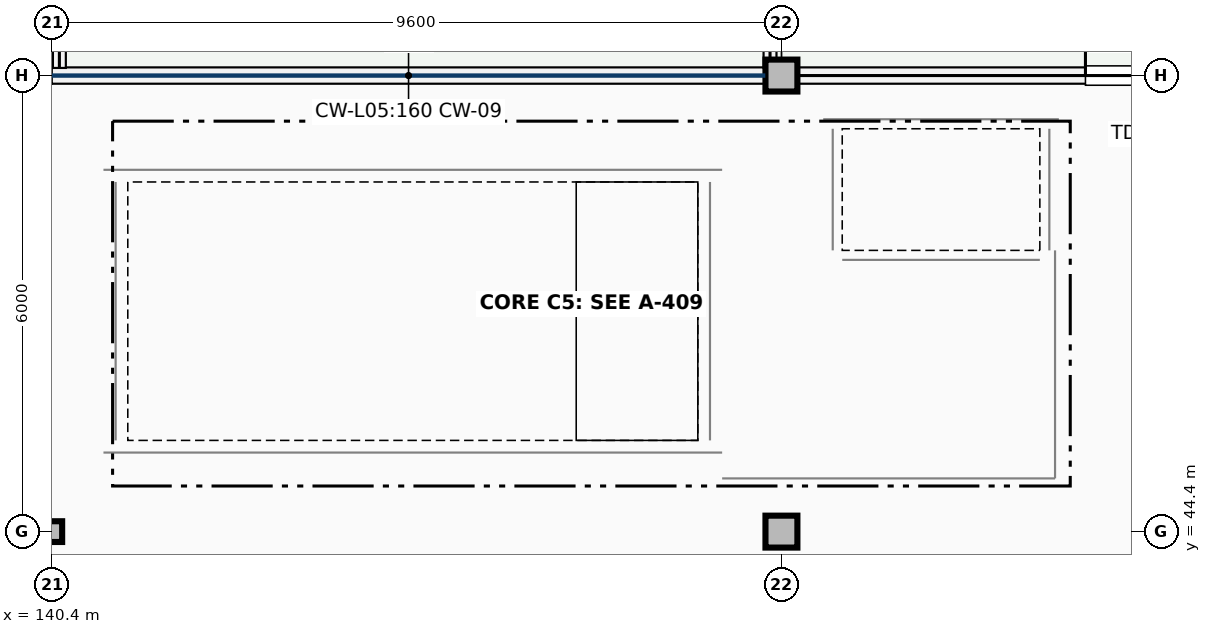
"""IFC4 building model, lengths in metres.
Left out: names, types, materials, properties, quantities, classifications, styles, units other than length and angle.
Written with IfcOpenShell. Run it as: python <this file> out.ifc"""

import sys

from ifc_helpers import new_model, si_unit, direction, frame, frame_2d, origin, origin_2d, place, context, subcontext, project, spatial, rectangle, hollow_circle, extrude, element, fill, save


model = new_model("IFC4")
c1 = context("Model", 3, precision=1e-05, world=origin(), true_north=direction((0.0, 1.0)))
c2 = subcontext(c1, "Body", "Model", "MODEL_VIEW")
j1 = project(units=[si_unit("LENGTHUNIT", "METRE"), si_unit("PLANEANGLEUNIT", "RADIAN")], contexts=[c1])
p1 = place(None, origin())
s1 = spatial("IfcSite", under=j1, at=p1, CompositionType="ELEMENT")
p2 = place(p1, origin())
s2 = spatial("IfcBuilding", under=s1, at=p2, CompositionType="ELEMENT")
p3 = place(p2, frame((0.0, 0.0, 21.08)))
s3 = spatial("IfcBuildingStorey", under=s2, at=p3, CompositionType="ELEMENT", Elevation=21.08)
p4 = place(p3, frame((140.4, 44.4, 0.0), z_axis=(0.0, 0.0, 1.0), x_axis=(1.0, 0.0, 0.0)))
e1 = element("IfcColumn", 1, at=p4, inside=s3, PredefinedType="COLUMN", context=c2, shape_type="SweptSolid", body=[
    extrude(hollow_circle(Radius=0.136, WallThickness=0.012, at=origin_2d()), origin(), (0.0, 0.0, 1.0), 3.7),
])
for number, where, z_axis, x_axis in (
    (2, (150.0, 44.4, 0.0), (0.0, 0.0, 1.0), (1.0, 0.0, 0.0)),
    (3, (150.0, 50.4, 0.0), (0.0, 0.0, 1.0), (1.0, 0.0, 0.0)),
):
    element("IfcColumn", number, at=place(p3, frame(where, z_axis=z_axis, x_axis=x_axis)), inside=s3, PredefinedType="COLUMN", context=c2, shape_type="SweptSolid", body=[
        extrude(rectangle(XDim=0.42, YDim=0.42, at=origin_2d()), origin(), (0.0, 0.0, 1.0), 3.74),
    ])
p5 = place(p3, frame((140.4, 50.4, 0.0), z_axis=(0.0, 0.0, 1.0), x_axis=(1.0, 0.0, 0.0)))
e4 = element("IfcWall", 4, at=p5, inside=s3, PredefinedType="SOLIDWALL", context=c2, shape_type="SweptSolid", body=[
    extrude(rectangle(XDim=9.388, YDim=0.215, at=frame_2d((4.694, 0.0))), origin(), (0.0, 0.0, 1.0), 0.85),
])
p6 = place(p3, frame((150.212, 50.4, 0.0), z_axis=(0.0, 0.0, 1.0), x_axis=(1.0, 0.0, 0.0)))
e5 = element("IfcWall", 5, at=p6, inside=s3, PredefinedType="SOLIDWALL", context=c2, shape_type="SweptSolid", body=[
    extrude(rectangle(XDim=9.25, YDim=0.215, at=frame_2d((4.625, 0.0))), origin(), (0.0, 0.0, 1.0), 2.884),
])
p7 = place(p6, frame((3.788, 0.0, 0.0)))
e6 = element("IfcOpeningElement", 6, at=p7, cuts=e5, PredefinedType="OPENING", context=c2, shape_type="SweptSolid", body=[
    extrude(rectangle(XDim=1.6, YDim=2.2, at=frame_2d((0.8, 1.1))), frame((0.0, 0.118, 0.0), z_axis=(0.0, -1.0, 0.0), x_axis=(1.0, 0.0, 0.0)), (0.0, 0.0, 1.0), 0.235),
])
for number, where, z_axis, x_axis in (
    (7, (149.85, 50.5, 0.0), (0.0, 0.0, 1.0), (0.0, 1.0, 0.0)),
    (8, (140.5, 79.1, 0.0), (0.0, 0.0, 1.0), (0.0, -1.0, 0.0)),
):
    element("IfcWall", number, at=place(p3, frame(where, z_axis=z_axis, x_axis=x_axis)), inside=s3, PredefinedType="PARAPET", context=c2, shape_type="SweptSolid", body=[
        extrude(rectangle(XDim=28.6, YDim=0.17, at=frame_2d((14.3, 0.0))), origin(), (0.0, 0.0, 1.0), 1.15),
    ])
p8 = place(p3, frame((141.24, 45.6, 0.0), z_axis=(0.0, 0.0, 1.0), x_axis=(0.0, 1.0, 0.0)))
e9 = element("IfcWall", 9, at=p8, inside=s3, PredefinedType="SHEAR", context=c2, shape_type="SweptSolid", body=[
    extrude(rectangle(XDim=3.4, YDim=0.32, at=frame_2d((1.7, 0.0))), origin(), (0.0, 0.0, 1.0), 3.74),
])
for number, where, z_axis, x_axis in (
    (10, (141.08, 45.44, 0.0), (0.0, 0.0, 1.0), (1.0, 0.0, 0.0)),
    (11, (141.08, 49.16, 0.0), (0.0, 0.0, 1.0), (1.0, 0.0, 0.0)),
):
    element("IfcWall", number, at=place(p3, frame(where, z_axis=z_axis, x_axis=x_axis)), inside=s3, PredefinedType="SHEAR", context=c2, shape_type="SweptSolid", body=[
        extrude(rectangle(XDim=8.14, YDim=0.32, at=frame_2d((4.07, 0.0))), origin(), (0.0, 0.0, 1.0), 3.74),
    ])
p9 = place(p3, frame((149.06, 45.6, 0.0), z_axis=(0.0, 0.0, 1.0), x_axis=(0.0, 1.0, 0.0)))
e12 = element("IfcWall", 12, at=p9, inside=s3, PredefinedType="SHEAR", context=c2, shape_type="SweptSolid", body=[
    extrude(rectangle(XDim=3.4, YDim=0.32, at=frame_2d((1.7, 0.0))), origin(), (0.0, 0.0, 1.0), 3.74),
])
p10 = place(p9, frame((0.65, 0.0, 0.0)))
e13 = element("IfcOpeningElement", 13, at=p10, cuts=e12, PredefinedType="OPENING", context=c2, shape_type="SweptSolid", body=[
    extrude(rectangle(XDim=1.2, YDim=2.2, at=frame_2d((0.6, 1.1))), frame((0.0, 0.17, 0.0), z_axis=(0.0, -1.0, 0.0), x_axis=(1.0, 0.0, 0.0)), (0.0, 0.0, 1.0), 0.34),
])
for number, where, z_axis, x_axis in (
    (14, (150.675, 48.1, 0.0), (0.0, 0.0, 1.0), (0.0, 1.0, 0.0)),
    (15, (153.525, 48.1, 0.0), (0.0, 0.0, 1.0), (0.0, 1.0, 0.0)),
):
    element("IfcWall", number, at=place(p3, frame(where, z_axis=z_axis, x_axis=x_axis)), inside=s3, PredefinedType="SHEAR", context=c2, shape_type="SweptSolid", body=[
        extrude(rectangle(XDim=1.6, YDim=0.25, at=frame_2d((0.8, 0.0))), origin(), (0.0, 0.0, 1.0), 3.74),
    ])
p11 = place(p3, frame((150.55, 49.825, 0.0), z_axis=(0.0, 0.0, 1.0), x_axis=(1.0, 0.0, 0.0)))
e16 = element("IfcWall", 16, at=p11, inside=s3, PredefinedType="SHEAR", context=c2, shape_type="SweptSolid", body=[
    extrude(rectangle(XDim=3.1, YDim=0.25, at=frame_2d((1.55, 0.0))), origin(), (0.0, 0.0, 1.0), 3.74),
])
p12 = place(p3, frame((150.8, 47.975, 0.0), z_axis=(0.0, 0.0, 1.0), x_axis=(1.0, 0.0, 0.0)))
e17 = element("IfcWall", 17, at=p12, inside=s3, PredefinedType="SHEAR", context=c2, shape_type="SweptSolid", body=[
    extrude(rectangle(XDim=2.6, YDim=0.25, at=frame_2d((1.3, 0.0))), origin(), (0.0, 0.0, 1.0), 3.74),
])
p13 = place(p12, frame((0.75, 0.0, 0.0)))
e18 = element("IfcOpeningElement", 18, at=p13, cuts=e17, PredefinedType="OPENING", context=c2, shape_type="SweptSolid", body=[
    extrude(rectangle(XDim=1.1, YDim=2.15, at=frame_2d((0.55, 1.075))), frame((0.0, 0.135, 0.0), z_axis=(0.0, -1.0, 0.0), x_axis=(1.0, 0.0, 0.0)), (0.0, 0.0, 1.0), 0.27),
])
p14 = place(p3, frame((153.6, 45.1, 0.0), z_axis=(0.0, 0.0, 1.0), x_axis=(0.0, 1.0, 0.0)))
e19 = element("IfcWall", 19, at=p14, inside=s3, PredefinedType="PARTITIONING", context=c2, shape_type="SweptSolid", body=[
    extrude(rectangle(XDim=3.0, YDim=0.2, at=frame_2d((1.5, 0.0))), origin(), (0.0, 0.0, 1.0), 3.164),
])
p15 = place(p14, frame((0.775, 0.0, 0.0)))
e20 = element("IfcOpeningElement", 20, at=p15, cuts=e19, PredefinedType="OPENING", context=c2, shape_type="SweptSolid", body=[
    extrude(rectangle(XDim=1.45, YDim=2.2, at=frame_2d((0.725, 1.1))), frame((0.0, 0.11, 0.0), z_axis=(0.0, -1.0, 0.0), x_axis=(1.0, 0.0, 0.0)), (0.0, 0.0, 1.0), 0.22),
])
p16 = place(p3, frame((149.22, 45.1, 0.0), z_axis=(0.0, 0.0, 1.0), x_axis=(1.0, 0.0, 0.0)))
e21 = element("IfcWall", 21, at=p16, inside=s3, PredefinedType="PARTITIONING", context=c2, shape_type="SweptSolid", body=[
    extrude(rectangle(XDim=4.38, YDim=0.2, at=frame_2d((2.19, 0.0))), origin(), (0.0, 0.0, 1.0), 3.164),
])
p17 = place(p7, origin())
e22 = element("IfcDoor", 22, at=p17, inside=s3, OperationType="DOUBLE_DOOR_SINGLE_SWING", PredefinedType="DOOR", context=c2, shape_type="SweptSolid", body=[
    extrude(rectangle(XDim=1.6, YDim=2.2, at=frame_2d((0.8, 1.1))), frame((0.0, 0.025, 0.0), z_axis=(0.0, -1.0, 0.0), x_axis=(1.0, 0.0, 0.0)), (0.0, 0.0, 1.0), 0.05),
])
fill(e6, e22)
p18 = place(p10, origin())
e23 = element("IfcDoor", 23, at=p18, inside=s3, OperationType="SINGLE_SWING_RIGHT", PredefinedType="DOOR", context=c2, shape_type="SweptSolid", body=[
    extrude(rectangle(XDim=1.2, YDim=2.2, at=frame_2d((0.6, 1.1))), frame((0.0, 0.025, 0.0), z_axis=(0.0, -1.0, 0.0), x_axis=(1.0, 0.0, 0.0)), (0.0, 0.0, 1.0), 0.05),
])
fill(e13, e23)
p19 = place(p13, origin())
e24 = element("IfcDoor", 24, at=p19, inside=s3, OperationType="DOUBLE_DOOR_SLIDING", PredefinedType="DOOR", context=c2, shape_type="SweptSolid", body=[
    extrude(rectangle(XDim=1.1, YDim=2.15, at=frame_2d((0.55, 1.075))), frame((0.0, 0.025, 0.0), z_axis=(0.0, -1.0, 0.0), x_axis=(1.0, 0.0, 0.0)), (0.0, 0.0, 1.0), 0.05),
])
fill(e18, e24)
p20 = place(p15, frame((1.45, 0.0, 0.0), z_axis=(0.0, 0.0, 1.0), x_axis=(-1.0, 0.0, 0.0)))
e25 = element("IfcDoor", 25, at=p20, inside=s3, OperationType="DOUBLE_DOOR_SINGLE_SWING", PredefinedType="DOOR", context=c2, shape_type="SweptSolid", body=[
    extrude(rectangle(XDim=1.45, YDim=2.2, at=frame_2d((0.725, 1.1))), frame((0.0, 0.025, 0.0), z_axis=(0.0, -1.0, 0.0), x_axis=(1.0, 0.0, 0.0)), (0.0, 0.0, 1.0), 0.05),
])
fill(e20, e25)
save(model, sys.argv[1])
